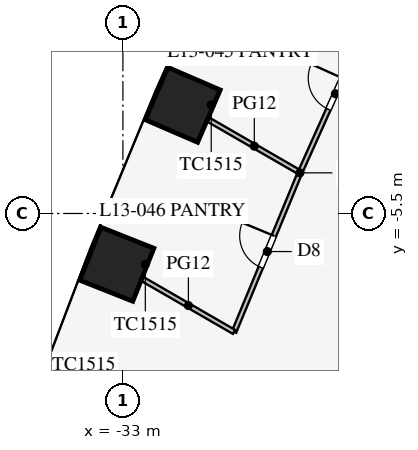
"""IFC4 building model, lengths in metres.
Left out: names, types, materials, properties, quantities, classifications, styles, units other than length and angle.
Written with IfcOpenShell. Run it as: python <this file> out.ifc"""

import sys

from ifc_helpers import new_model, si_unit, direction, frame, frame_2d, origin, origin_2d, place, context, subcontext, project, spatial, rectangle, extrude, element, fill, save


model = new_model("IFC4")
c1 = context("Model", 3, precision=1e-05, world=origin(), true_north=direction((0.0, 1.0)))
c2 = subcontext(c1, "Body", "Model", "MODEL_VIEW")
j1 = project(units=[si_unit("LENGTHUNIT", "METRE"), si_unit("PLANEANGLEUNIT", "RADIAN")], contexts=[c1])
p1 = place(None, origin())
s1 = spatial("IfcSite", under=j1, at=p1, CompositionType="ELEMENT")
p2 = place(p1, origin())
s2 = spatial("IfcBuilding", under=s1, at=p2, CompositionType="ELEMENT")
p3 = place(p2, frame((0.0, 0.0, 58.5)))
s3 = spatial("IfcBuildingStorey", under=s2, at=p3, CompositionType="ELEMENT", Elevation=58.5)
for number, where, z_axis, x_axis in (
    (1, (-31.426, -2.641, 0.0), (0.0, 0.0, 1.0), (-0.396, -0.918, 0.0)),
    (2, (-33.16, -6.836, 0.0), (0.0, 0.0, 1.0), (-0.369, -0.929, 0.0)),
):
    element("IfcColumn", number, at=place(p3, frame(where, z_axis=z_axis, x_axis=x_axis)), inside=s3, PredefinedType="COLUMN", context=c2, shape_type="SweptSolid", body=[
        extrude(rectangle(XDim=1.5, YDim=1.5, at=origin_2d()), origin(), (0.0, 0.0, 1.0), 4.2),
    ])
p4 = place(p3, frame((-14.203, -8.2, 0.0), z_axis=(0.0, 0.0, 1.0), x_axis=(-0.866024965723, -0.500000758745, 0.0)))
e3 = element("IfcWall", 3, at=p4, inside=s3, PredefinedType="PARTITIONING", context=c2, shape_type="SweptSolid", body=[
    extrude(rectangle(XDim=18.25, YDim=0.15, at=frame_2d((9.125, 0.0))), origin(), (0.0, 0.0, 1.0), 2.3),
])
p5 = place(p3, frame((-26.487, -0.296, 0.0), z_axis=(0.0, 0.0, 1.0), x_axis=(-0.409451055745, -0.912332084796, 0.0)))
e4 = element("IfcWall", 4, at=p5, inside=s3, PredefinedType="PARTITIONING", context=c2, shape_type="SweptSolid", body=[
    extrude(rectangle(XDim=4.523, YDim=0.12, at=frame_2d((2.262, 0.0))), origin(), (0.0, 0.0, 1.0), 2.9),
])
p6 = place(p5, frame((1.8, 0.0, 0.15)))
e5 = element("IfcOpeningElement", 5, at=p6, cuts=e4, PredefinedType="OPENING", context=c2, shape_type="SweptSolid", body=[
    extrude(rectangle(XDim=0.9, YDim=2.1, at=frame_2d((0.45, 1.05))), frame((0.0, 0.07, 0.0), z_axis=(0.0, -1.0, 0.0), x_axis=(1.0, 0.0, 0.0)), (0.0, 0.0, 1.0), 0.14),
])
p7 = place(p3, frame((-28.339, -4.423, 0.0), z_axis=(0.0, 0.0, 1.0), x_axis=(-0.382639984525, -0.923897527999, 0.0)))
e6 = element("IfcWall", 6, at=p7, inside=s3, PredefinedType="PARTITIONING", context=c2, shape_type="SweptSolid", body=[
    extrude(rectangle(XDim=4.539, YDim=0.12, at=frame_2d((2.27, 0.0))), origin(), (0.0, 0.0, 1.0), 2.9),
])
p8 = place(p7, frame((1.8, 0.0, 0.15)))
e7 = element("IfcOpeningElement", 7, at=p8, cuts=e6, PredefinedType="OPENING", context=c2, shape_type="SweptSolid", body=[
    extrude(rectangle(XDim=0.9, YDim=2.1, at=frame_2d((0.45, 1.05))), frame((0.0, 0.07, 0.0), z_axis=(0.0, -1.0, 0.0), x_axis=(1.0, 0.0, 0.0)), (0.0, 0.0, 1.0), 0.14),
])
p9 = place(p3, frame((-28.339, -4.423, 0.0), z_axis=(0.0, 0.0, 1.0), x_axis=(-0.866029066823, 0.499993655377, 0.0)))
e8 = element("IfcWall", 8, at=p9, inside=s3, PredefinedType="PARTITIONING", context=c2, shape_type="SweptSolid", body=[
    extrude(rectangle(XDim=2.779, YDim=0.12, at=frame_2d((1.39, 0.0))), origin(), (0.0, 0.0, 1.0), 2.6),
])
p10 = place(p3, frame((-30.076, -8.617, 0.0), z_axis=(0.0, 0.0, 1.0), x_axis=(-0.866002324719, 0.500039971984, 0.0)))
e9 = element("IfcWall", 9, at=p10, inside=s3, PredefinedType="PARTITIONING", context=c2, shape_type="SweptSolid", body=[
    extrude(rectangle(XDim=2.773, YDim=0.12, at=frame_2d((1.387, 0.0))), origin(), (0.0, 0.0, 1.0), 2.8),
])
p11 = place(p6, frame((0.9, 0.0, 0.0), z_axis=(0.0, 0.0, 1.0), x_axis=(-1.0, 0.0, 0.0)))
e10 = element("IfcDoor", 10, at=p11, inside=s3, OperationType="SINGLE_SWING_RIGHT", PredefinedType="DOOR", context=c2, shape_type="SweptSolid", body=[
    extrude(rectangle(XDim=0.9, YDim=2.1, at=frame_2d((0.45, 1.05))), frame((0.0, 0.025, 0.0), z_axis=(0.0, -1.0, 0.0), x_axis=(1.0, 0.0, 0.0)), (0.0, 0.0, 1.0), 0.05),
])
fill(e5, e10)
p12 = place(p8, frame((0.9, 0.0, 0.0), z_axis=(0.0, 0.0, 1.0), x_axis=(-1.0, 0.0, 0.0)))
e11 = element("IfcDoor", 11, at=p12, inside=s3, OperationType="SINGLE_SWING_RIGHT", PredefinedType="DOOR", context=c2, shape_type="SweptSolid", body=[
    extrude(rectangle(XDim=0.9, YDim=2.1, at=frame_2d((0.45, 1.05))), frame((0.0, 0.025, 0.0), z_axis=(0.0, -1.0, 0.0), x_axis=(1.0, 0.0, 0.0)), (0.0, 0.0, 1.0), 0.05),
])
fill(e7, e11)
save(model, sys.argv[1])
